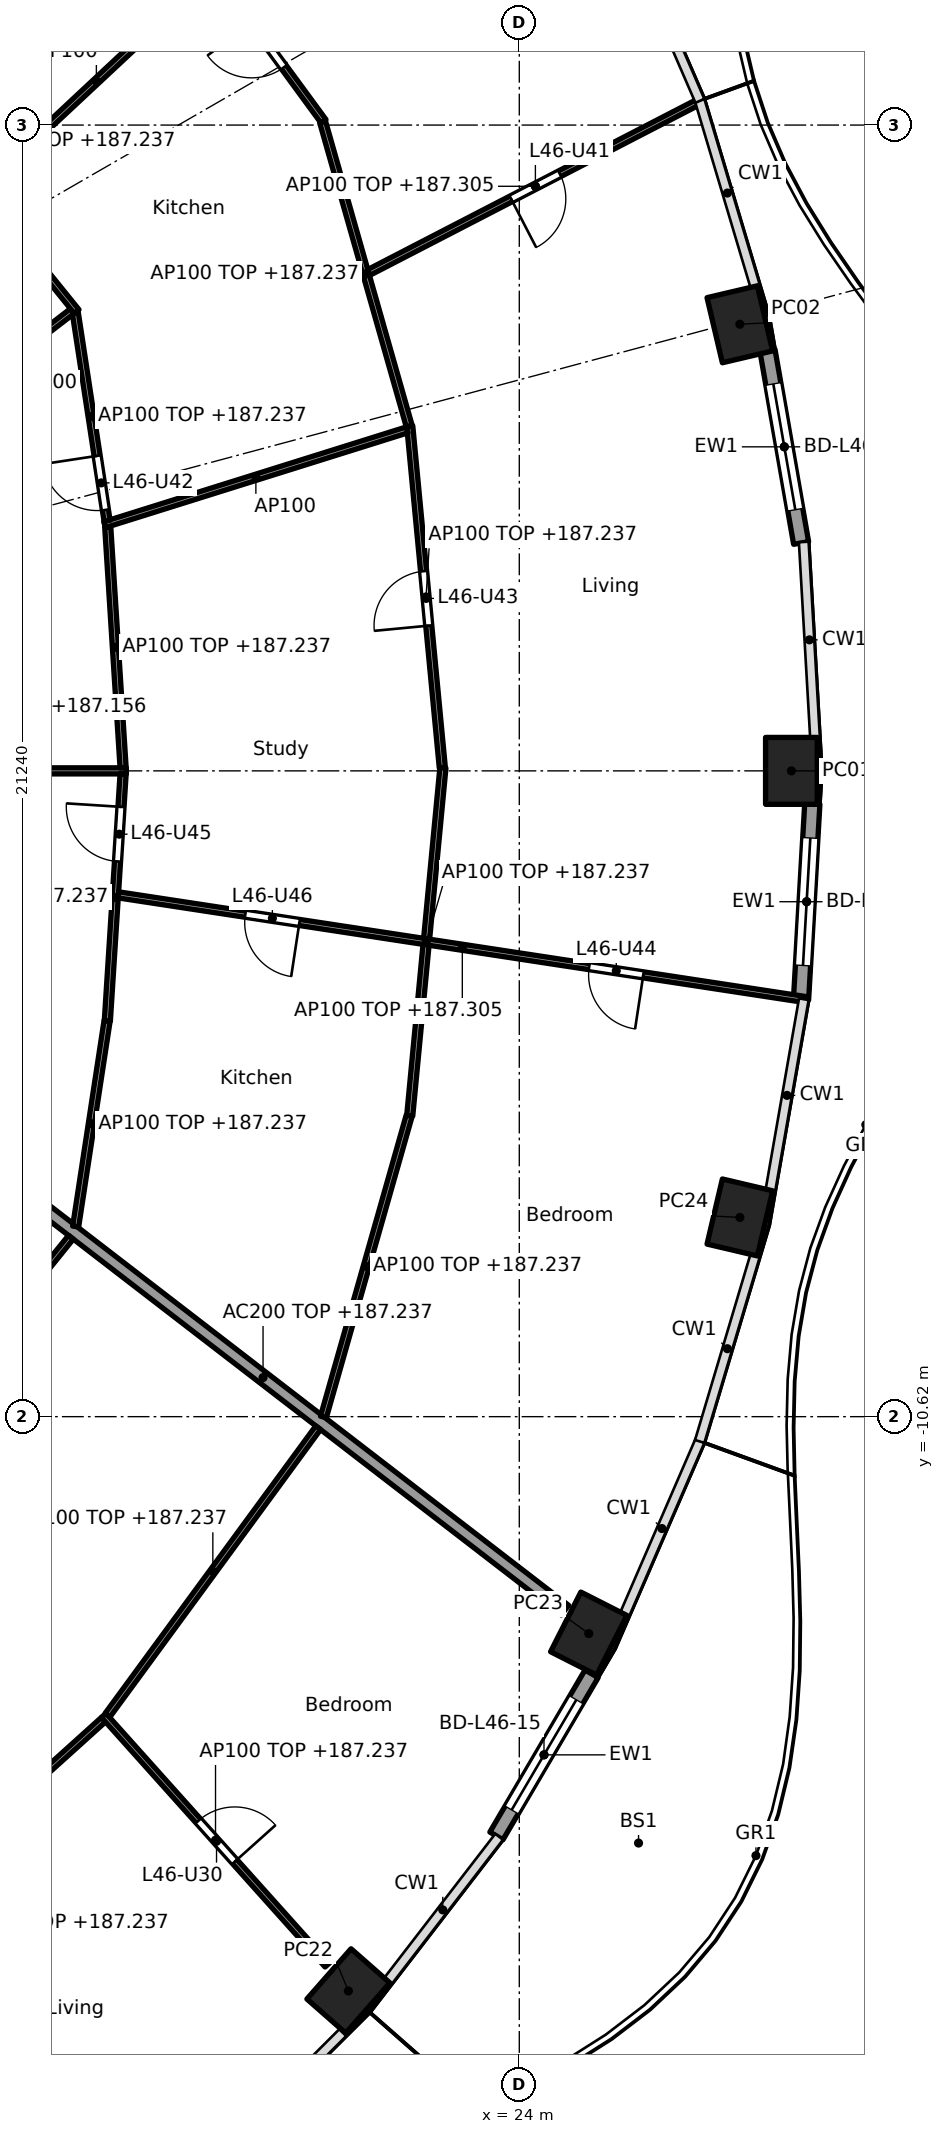
"""IFC4 building model, lengths in metres.
Left out: names, types, materials, properties, quantities, classifications, styles, units other than length and angle.
Written with IfcOpenShell. Run it as: python <this file> out.ifc"""

import sys

from ifc_helpers import new_model, si_unit, direction, frame, frame_2d, origin, origin_2d, place, context, subcontext, project, spatial, rectangle, hollow_rectangle, extrude, element, fill, save


model = new_model("IFC4")
c1 = context("Model", 3, precision=1e-05, world=origin(), true_north=direction((0.0, 1.0)))
c2 = subcontext(c1, "Body", "Model", "MODEL_VIEW")
j1 = project(units=[si_unit("LENGTHUNIT", "METRE"), si_unit("PLANEANGLEUNIT", "RADIAN")], contexts=[c1])
p1 = place(None, origin())
s1 = spatial("IfcSite", under=j1, at=p1, CompositionType="ELEMENT")
p2 = place(p1, origin())
s2 = spatial("IfcBuilding", under=s1, at=p2, CompositionType="ELEMENT")
p3 = place(p2, frame((0.0, 0.0, 184.4)))
s3 = spatial("IfcBuildingStorey", under=s2, at=p3, CompositionType="ELEMENT", Elevation=184.4)
for number, where, z_axis, x_axis in (
    (1, (28.475, 0.0, 0.0), (0.0, 0.0, 1.0), (0.0, 1.0, 0.0)),
    (2, (27.627, 7.344, 0.0), (0.0, 0.0, 1.0), (-0.229, 0.973, 0.0)),
    (3, (21.189, -20.064, 0.0), (0.0, 0.0, 1.0), (0.66, 0.751, 0.0)),
    (4, (25.142, -14.188, 0.0), (0.0, 0.0, 1.0), (0.452, 0.892, 0.0)),
    (5, (27.627, -7.344, 0.0), (0.0, 0.0, 1.0), (0.229, 0.973, 0.0)),
):
    element("IfcColumn", number, at=place(p3, frame(where, z_axis=z_axis, x_axis=x_axis)), inside=s3, PredefinedType="COLUMN", context=c2, shape_type="SweptSolid", body=[
        extrude(hollow_rectangle(XDim=1.1, YDim=0.85, WallThickness=0.036, at=origin_2d()), origin(), (0.0, 0.0, 1.0), 3.7),
    ])
p4 = place(p3, frame((28.082, 6.91, 0.0), z_axis=(0.0, 0.0, 1.0), x_axis=(0.172149769468, -0.985070787747, 0.0)))
e6 = element("IfcWall", 6, at=p4, inside=s3, PredefinedType="SOLIDWALL", context=c2, shape_type="SweptSolid", body=[
    extrude(rectangle(XDim=3.211, YDim=0.25, at=frame_2d((1.605, 0.0))), origin(), (0.0, 0.0, 1.0), 3.44),
])
p5 = place(p4, frame((0.555, 0.0, 0.0)))
e7 = element("IfcOpeningElement", 7, at=p5, cuts=e6, PredefinedType="OPENING", context=c2, shape_type="SweptSolid", body=[
    extrude(rectangle(XDim=2.1, YDim=2.4, at=frame_2d((1.05, 1.2))), frame((0.0, 0.135, 0.0), z_axis=(0.0, -1.0, 0.0), x_axis=(1.0, 0.0, 0.0)), (0.0, 0.0, 1.0), 0.27),
])
p6 = place(p3, frame((25.189, -14.848, 0.0), z_axis=(0.0, 0.0, 1.0), x_axis=(-0.506367803691, -0.862317602386, 0.0)))
e8 = element("IfcWall", 8, at=p6, inside=s3, PredefinedType="SOLIDWALL", context=c2, shape_type="SweptSolid", body=[
    extrude(rectangle(XDim=3.092, YDim=0.25, at=frame_2d((1.546, 0.0))), origin(), (0.0, 0.0, 1.0), 3.44),
])
p7 = place(p6, frame((0.496, 0.0, 0.0)))
e9 = element("IfcOpeningElement", 9, at=p7, cuts=e8, PredefinedType="OPENING", context=c2, shape_type="SweptSolid", body=[
    extrude(rectangle(XDim=2.1, YDim=2.4, at=frame_2d((1.05, 1.2))), frame((0.0, 0.135, 0.0), z_axis=(0.0, -1.0, 0.0), x_axis=(1.0, 0.0, 0.0)), (0.0, 0.0, 1.0), 0.27),
])
p8 = place(p3, frame((28.819, -0.542, 0.0), z_axis=(0.0, 0.0, 1.0), x_axis=(-0.057532692854, -0.998343622834, 0.0)))
e10 = element("IfcWall", 10, at=p8, inside=s3, PredefinedType="SOLIDWALL", context=c2, shape_type="SweptSolid", body=[
    extrude(rectangle(XDim=3.225, YDim=0.25, at=frame_2d((1.613, 0.0))), origin(), (0.0, 0.0, 1.0), 3.44),
])
p9 = place(p8, frame((0.562, 0.0, 0.0)))
e11 = element("IfcOpeningElement", 11, at=p9, cuts=e10, PredefinedType="OPENING", context=c2, shape_type="SweptSolid", body=[
    extrude(rectangle(XDim=2.1, YDim=2.4, at=frame_2d((1.05, 1.2))), frame((0.0, 0.135, 0.0), z_axis=(0.0, -1.0, 0.0), x_axis=(1.0, 0.0, 0.0)), (0.0, 0.0, 1.0), 0.27),
])
p10 = place(p3, frame((14.822, -6.154, 0.0), z_axis=(0.0, 0.0, 1.0), x_axis=(0.792203056092, -0.610257583254, 0.0)))
e12 = element("IfcWall", 12, at=p10, inside=s3, PredefinedType="PARTITIONING", context=c2, shape_type="SweptSolid", body=[
    extrude(rectangle(XDim=12.533, YDim=0.2, at=frame_2d((6.266, 0.0))), origin(), (0.0, 0.0, 1.0), 2.837),
])
p11 = place(p3, frame((12.665, 0.0, 0.0), z_axis=(0.0, 0.0, 1.0), x_axis=(1.0, 0.0, 0.0)))
e13 = element("IfcWall", 13, at=p11, inside=s3, PredefinedType="PARTITIONING", context=c2, shape_type="SweptSolid", body=[
    extrude(rectangle(XDim=4.873, YDim=0.1, at=frame_2d((2.437, 0.0))), origin(), (0.0, 0.0, 1.0), 2.756),
])
p12 = place(p3, frame((17.485, 0.05, 0.0), z_axis=(0.0, 0.0, 1.0), x_axis=(-0.063679314345, 0.99797041285, 0.0)))
e14 = element("IfcWall", 14, at=p12, inside=s3, PredefinedType="PARTITIONING", context=c2, shape_type="SweptSolid", body=[
    extrude(rectangle(XDim=3.972, YDim=0.1, at=frame_2d((1.986, 0.0))), origin(), (0.0, 0.0, 1.0), 2.837),
])
p13 = place(p3, frame((17.485, -0.05, 0.0), z_axis=(0.0, 0.0, 1.0), x_axis=(-0.063673473968, -0.997970785501, 0.0)))
e15 = element("IfcWall", 15, at=p13, inside=s3, PredefinedType="PARTITIONING", context=c2, shape_type="SweptSolid", body=[
    extrude(rectangle(XDim=4.072, YDim=0.1, at=frame_2d((2.036, 0.0))), origin(), (0.0, 0.0, 1.0), 2.837),
])
p14 = place(p13, frame((0.543, 0.0, 0.0)))
e16 = element("IfcOpeningElement", 16, at=p14, cuts=e15, PredefinedType="OPENING", context=c2, shape_type="SweptSolid", body=[
    extrude(rectangle(XDim=0.9, YDim=2.1, at=frame_2d((0.45, 1.05))), frame((0.0, 0.06, 0.0), z_axis=(0.0, -1.0, 0.0), x_axis=(1.0, 0.0, 0.0)), (0.0, 0.0, 1.0), 0.12),
])
p15 = place(p3, frame((22.734, 0.05, 0.0), z_axis=(0.0, 0.0, 1.0), x_axis=(-0.0949274088, 0.995484197292, 0.0)))
e17 = element("IfcWall", 17, at=p15, inside=s3, PredefinedType="PARTITIONING", context=c2, shape_type="SweptSolid", body=[
    extrude(rectangle(XDim=5.648, YDim=0.1, at=frame_2d((2.824, 0.0))), origin(), (0.0, 0.0, 1.0), 2.837),
])
p16 = place(p15, frame((2.349, 0.0, 0.0)))
e18 = element("IfcOpeningElement", 18, at=p16, cuts=e17, PredefinedType="OPENING", context=c2, shape_type="SweptSolid", body=[
    extrude(rectangle(XDim=0.9, YDim=2.1, at=frame_2d((0.45, 1.05))), frame((0.0, 0.06, 0.0), z_axis=(0.0, -1.0, 0.0), x_axis=(1.0, 0.0, 0.0)), (0.0, 0.0, 1.0), 0.12),
])
p17 = place(p3, frame((22.744, 0.05, 0.0), z_axis=(0.0, 0.0, 1.0), x_axis=(-0.094931362305, -0.995483820286, 0.0)))
e19 = element("IfcWall", 19, at=p17, inside=s3, PredefinedType="PARTITIONING", context=c2, shape_type="SweptSolid", body=[
    extrude(rectangle(XDim=5.748, YDim=0.1, at=frame_2d((2.874, 0.0))), origin(), (0.0, 0.0, 1.0), 2.837),
])
p18 = place(p3, frame((17.181, 4.049, 0.0), z_axis=(0.0, 0.0, 1.0), x_axis=(0.954246359918, 0.299021545351, 0.0)))
e20 = element("IfcWall", 20, at=p18, inside=s3, PredefinedType="PARTITIONING", context=c2, shape_type="SweptSolid", body=[
    extrude(rectangle(XDim=5.213, YDim=0.1, at=frame_2d((2.606, 0.0))), origin(), (0.0, 0.0, 1.0), 3.44),
])
p19 = place(p3, frame((17.221, 4.113, 0.0), z_axis=(0.0, 0.0, 1.0), x_axis=(-0.151078880423, 0.988521710379, 0.0)))
e21 = element("IfcWall", 21, at=p19, inside=s3, PredefinedType="PARTITIONING", context=c2, shape_type="SweptSolid", body=[
    extrude(rectangle(XDim=3.469, YDim=0.1, at=frame_2d((1.735, 0.0))), origin(), (0.0, 0.0, 1.0), 2.837),
])
p20 = place(p19, frame((0.18, 0.0, 0.0)))
e22 = element("IfcOpeningElement", 22, at=p20, cuts=e21, PredefinedType="OPENING", context=c2, shape_type="SweptSolid", body=[
    extrude(rectangle(XDim=0.9, YDim=2.1, at=frame_2d((0.45, 1.05))), frame((0.0, 0.06, 0.0), z_axis=(0.0, -1.0, 0.0), x_axis=(1.0, 0.0, 0.0)), (0.0, 0.0, 1.0), 0.12),
])
p21 = place(p3, frame((22.189, 5.67, 0.0), z_axis=(0.0, 0.0, 1.0), x_axis=(-0.273815967041, 0.961782104322, 0.0)))
e23 = element("IfcWall", 23, at=p21, inside=s3, PredefinedType="PARTITIONING", context=c2, shape_type="SweptSolid", body=[
    extrude(rectangle(XDim=5.202, YDim=0.1, at=frame_2d((2.601, 0.0))), origin(), (0.0, 0.0, 1.0), 2.837),
])
p22 = place(p3, frame((21.522, 8.195, 0.0), z_axis=(0.0, 0.0, 1.0), x_axis=(0.888281046031, 0.459300319249, 0.0)))
e24 = element("IfcWall", 24, at=p22, inside=s3, PredefinedType="PARTITIONING", context=c2, shape_type="SweptSolid", body=[
    extrude(rectangle(XDim=6.176, YDim=0.1, at=frame_2d((3.088, 0.0))), origin(), (0.0, 0.0, 1.0), 2.905),
])
p23 = place(p22, frame((2.638, 0.0, 0.0)))
e25 = element("IfcOpeningElement", 25, at=p23, cuts=e24, PredefinedType="OPENING", context=c2, shape_type="SweptSolid", body=[
    extrude(rectangle(XDim=0.9, YDim=2.1, at=frame_2d((0.45, 1.05))), frame((0.0, 0.06, 0.0), z_axis=(0.0, -1.0, 0.0), x_axis=(1.0, 0.0, 0.0)), (0.0, 0.0, 1.0), 0.12),
])
p24 = place(p3, frame((14.822, 6.154, 0.0), z_axis=(0.0, 0.0, 1.0), x_axis=(0.792226528082, 0.610227111987, 0.0)))
e26 = element("IfcWall", 26, at=p24, inside=s3, PredefinedType="PARTITIONING", context=c2, shape_type="SweptSolid", body=[
    extrude(rectangle(XDim=2.307, YDim=0.1, at=frame_2d((1.154, 0.0))), origin(), (0.0, 0.0, 1.0), 3.44),
])
p25 = place(p3, frame((16.721, 7.553, 0.0), z_axis=(0.0, 0.0, 1.0), x_axis=(-0.628753513808, 0.777604667472, 0.0)))
e27 = element("IfcWall", 27, at=p25, inside=s3, PredefinedType="PARTITIONING", context=c2, shape_type="SweptSolid", body=[
    extrude(rectangle(XDim=5.007, YDim=0.1, at=frame_2d((2.504, 0.0))), origin(), (0.0, 0.0, 1.0), 2.837),
])
p26 = place(p3, frame((20.781, 10.681, 0.0), z_axis=(0.0, 0.0, 1.0), x_axis=(-0.591117075283, 0.806585769345, 0.0)))
e28 = element("IfcWall", 28, at=p26, inside=s3, PredefinedType="PARTITIONING", context=c2, shape_type="SweptSolid", body=[
    extrude(rectangle(XDim=6.01, YDim=0.1, at=frame_2d((3.005, 0.0))), origin(), (0.0, 0.0, 1.0), 2.837),
])
p27 = place(p26, frame((1.103, 0.0, 0.0)))
e29 = element("IfcOpeningElement", 29, at=p27, cuts=e28, PredefinedType="OPENING", context=c2, shape_type="SweptSolid", body=[
    extrude(rectangle(XDim=0.9, YDim=2.1, at=frame_2d((0.45, 1.05))), frame((0.0, 0.06, 0.0), z_axis=(0.0, -1.0, 0.0), x_axis=(1.0, 0.0, 0.0)), (0.0, 0.0, 1.0), 0.12),
])
p28 = place(p3, frame((15.152, 9.573, 0.0), z_axis=(0.0, 0.0, 1.0), x_axis=(0.730723083214, 0.682673989294, 0.0)))
e30 = element("IfcWall", 30, at=p28, inside=s3, PredefinedType="PARTITIONING", context=c2, shape_type="SweptSolid", body=[
    extrude(rectangle(XDim=5.183, YDim=0.1, at=frame_2d((2.591, 0.0))), origin(), (0.0, 0.0, 1.0), 3.44),
])
p29 = place(p3, frame((10.178, 7.732, 0.0), z_axis=(0.0, 0.0, 1.0), x_axis=(0.667280084362, 0.744806880348, 0.0)))
e31 = element("IfcWall", 31, at=p29, inside=s3, PredefinedType="PARTITIONING", context=c2, shape_type="SweptSolid", body=[
    extrude(rectangle(XDim=10.572, YDim=0.1, at=frame_2d((5.286, 0.0))), origin(), (0.0, 0.0, 1.0), 2.756),
])
p30 = place(p29, frame((2.07, 0.0, 0.0)))
e32 = element("IfcOpeningElement", 32, at=p30, cuts=e31, PredefinedType="OPENING", context=c2, shape_type="SweptSolid", body=[
    extrude(rectangle(XDim=0.9, YDim=2.1, at=frame_2d((0.45, 1.05))), frame((0.0, 0.06, 0.0), z_axis=(0.0, -1.0, 0.0), x_axis=(1.0, 0.0, 0.0)), (0.0, 0.0, 1.0), 0.12),
])
p31 = place(p29, frame((7.331, 0.0, 0.0)))
e33 = element("IfcOpeningElement", 33, at=p31, cuts=e31, PredefinedType="OPENING", context=c2, shape_type="SweptSolid", body=[
    extrude(rectangle(XDim=0.9, YDim=2.1, at=frame_2d((0.45, 1.05))), frame((0.0, 0.06, 0.0), z_axis=(0.0, -1.0, 0.0), x_axis=(1.0, 0.0, 0.0)), (0.0, 0.0, 1.0), 0.12),
])
p32 = place(p3, frame((12.971, -19.38, 0.0), z_axis=(0.0, 0.0, 1.0), x_axis=(0.742768881471, 0.669547898748, 0.0)))
e34 = element("IfcWall", 34, at=p32, inside=s3, PredefinedType="PARTITIONING", context=c2, shape_type="SweptSolid", body=[
    extrude(rectangle(XDim=5.642, YDim=0.1, at=frame_2d((2.821, 0.0))), origin(), (0.0, 0.0, 1.0), 2.837),
])
p33 = place(p3, frame((13.572, -11.447, 0.0), z_axis=(0.0, 0.0, 1.0), x_axis=(0.628738316533, 0.777616955399, 0.0)))
e35 = element("IfcWall", 35, at=p33, inside=s3, PredefinedType="PARTITIONING", context=c2, shape_type="SweptSolid", body=[
    extrude(rectangle(XDim=4.857, YDim=0.1, at=frame_2d((2.429, 0.0))), origin(), (0.0, 0.0, 1.0), 2.837),
])
p34 = place(p33, frame((1.979, 0.0, 0.0)))
e36 = element("IfcOpeningElement", 36, at=p34, cuts=e35, PredefinedType="OPENING", context=c2, shape_type="SweptSolid", body=[
    extrude(rectangle(XDim=0.9, YDim=2.1, at=frame_2d((0.45, 1.05))), frame((0.0, 0.06, 0.0), z_axis=(0.0, -1.0, 0.0), x_axis=(1.0, 0.0, 0.0)), (0.0, 0.0, 1.0), 0.12),
])
p35 = place(p3, frame((17.166, -15.532, 0.0), z_axis=(0.0, 0.0, 1.0), x_axis=(0.66728415915, -0.744803229684, 0.0)))
e37 = element("IfcWall", 37, at=p35, inside=s3, PredefinedType="PARTITIONING", context=c2, shape_type="SweptSolid", body=[
    extrude(rectangle(XDim=5.511, YDim=0.1, at=frame_2d((2.756, 0.0))), origin(), (0.0, 0.0, 1.0), 2.837),
])
p36 = place(p35, frame((2.331, 0.0, 0.0)))
e38 = element("IfcOpeningElement", 38, at=p36, cuts=e37, PredefinedType="OPENING", context=c2, shape_type="SweptSolid", body=[
    extrude(rectangle(XDim=0.9, YDim=2.1, at=frame_2d((0.45, 1.05))), frame((0.0, 0.06, 0.0), z_axis=(0.0, -1.0, 0.0), x_axis=(1.0, 0.0, 0.0)), (0.0, 0.0, 1.0), 0.12),
])
p37 = place(p3, frame((17.229, -15.529, 0.0), z_axis=(0.0, 0.0, 1.0), x_axis=(0.591110768293, 0.806590391468, 0.0)))
e39 = element("IfcWall", 39, at=p37, inside=s3, PredefinedType="PARTITIONING", context=c2, shape_type="SweptSolid", body=[
    extrude(rectangle(XDim=5.86, YDim=0.1, at=frame_2d((2.93, 0.0))), origin(), (0.0, 0.0, 1.0), 2.837),
])
p38 = place(p3, frame((16.704, -7.493, 0.0), z_axis=(0.0, 0.0, 1.0), x_axis=(0.1510806336, 0.988521442434, 0.0)))
e40 = element("IfcWall", 40, at=p38, inside=s3, PredefinedType="PARTITIONING", context=c2, shape_type="SweptSolid", body=[
    extrude(rectangle(XDim=3.419, YDim=0.1, at=frame_2d((1.71, 0.0))), origin(), (0.0, 0.0, 1.0), 2.837),
])
p39 = place(p3, frame((20.779, -10.625, 0.0), z_axis=(0.0, 0.0, 1.0), x_axis=(0.273819702124, 0.961781040949, 0.0)))
e41 = element("IfcWall", 41, at=p39, inside=s3, PredefinedType="PARTITIONING", context=c2, shape_type="SweptSolid", body=[
    extrude(rectangle(XDim=5.152, YDim=0.1, at=frame_2d((2.576, 0.0))), origin(), (0.0, 0.0, 1.0), 2.837),
])
p40 = place(p3, frame((17.407, -2.039, 0.0), z_axis=(0.0, 0.0, 1.0), x_axis=(0.98858728603, -0.150649188184, 0.0)))
e42 = element("IfcWall", 42, at=p40, inside=s3, PredefinedType="PARTITIONING", context=c2, shape_type="SweptSolid", body=[
    extrude(rectangle(XDim=11.441, YDim=0.1, at=frame_2d((5.721, 0.0))), origin(), (0.0, 0.0, 1.0), 2.905),
])
p41 = place(p40, frame((7.832, 0.0, 0.0)))
e43 = element("IfcOpeningElement", 43, at=p41, cuts=e42, PredefinedType="OPENING", context=c2, shape_type="SweptSolid", body=[
    extrude(rectangle(XDim=0.9, YDim=2.1, at=frame_2d((0.45, 1.05))), frame((0.0, 0.06, 0.0), z_axis=(0.0, -1.0, 0.0), x_axis=(1.0, 0.0, 0.0)), (0.0, 0.0, 1.0), 0.12),
])
p42 = place(p40, frame((2.111, 0.0, 0.0)))
e44 = element("IfcOpeningElement", 44, at=p42, cuts=e42, PredefinedType="OPENING", context=c2, shape_type="SweptSolid", body=[
    extrude(rectangle(XDim=0.9, YDim=2.1, at=frame_2d((0.45, 1.05))), frame((0.0, 0.06, 0.0), z_axis=(0.0, -1.0, 0.0), x_axis=(1.0, 0.0, 0.0)), (0.0, 0.0, 1.0), 0.12),
])
p43 = place(p5, origin())
e45 = element("IfcDoor", 45, at=p43, inside=s3, OperationType="SLIDING_TO_LEFT", PredefinedType="DOOR", context=c2, shape_type="SweptSolid", body=[
    extrude(rectangle(XDim=2.1, YDim=2.4, at=frame_2d((1.05, 1.2))), frame((0.0, 0.025, 0.0), z_axis=(0.0, -1.0, 0.0), x_axis=(1.0, 0.0, 0.0)), (0.0, 0.0, 1.0), 0.05),
])
fill(e7, e45)
p44 = place(p7, origin())
e46 = element("IfcDoor", 46, at=p44, inside=s3, OperationType="SLIDING_TO_LEFT", PredefinedType="DOOR", context=c2, shape_type="SweptSolid", body=[
    extrude(rectangle(XDim=2.1, YDim=2.4, at=frame_2d((1.05, 1.2))), frame((0.0, 0.025, 0.0), z_axis=(0.0, -1.0, 0.0), x_axis=(1.0, 0.0, 0.0)), (0.0, 0.0, 1.0), 0.05),
])
fill(e9, e46)
p45 = place(p9, origin())
e47 = element("IfcDoor", 47, at=p45, inside=s3, OperationType="SLIDING_TO_LEFT", PredefinedType="DOOR", context=c2, shape_type="SweptSolid", body=[
    extrude(rectangle(XDim=2.1, YDim=2.4, at=frame_2d((1.05, 1.2))), frame((0.0, 0.025, 0.0), z_axis=(0.0, -1.0, 0.0), x_axis=(1.0, 0.0, 0.0)), (0.0, 0.0, 1.0), 0.05),
])
fill(e11, e47)
p46 = place(p36, origin())
e48 = element("IfcDoor", 48, at=p46, inside=s3, OperationType="SINGLE_SWING_RIGHT", PredefinedType="DOOR", context=c2, shape_type="SweptSolid", body=[
    extrude(rectangle(XDim=0.9, YDim=2.1, at=frame_2d((0.45, 1.05))), frame((0.0, 0.025, 0.0), z_axis=(0.0, -1.0, 0.0), x_axis=(1.0, 0.0, 0.0)), (0.0, 0.0, 1.0), 0.05),
])
fill(e38, e48)
p47 = place(p27, origin())
e49 = element("IfcDoor", 49, at=p47, inside=s3, OperationType="SINGLE_SWING_RIGHT", PredefinedType="DOOR", context=c2, shape_type="SweptSolid", body=[
    extrude(rectangle(XDim=0.9, YDim=2.1, at=frame_2d((0.45, 1.05))), frame((0.0, 0.025, 0.0), z_axis=(0.0, -1.0, 0.0), x_axis=(1.0, 0.0, 0.0)), (0.0, 0.0, 1.0), 0.05),
])
fill(e29, e49)
p48 = place(p23, frame((0.9, 0.0, 0.0), x_axis=(-1.0, 0.0, 0.0)))
e50 = element("IfcDoor", 50, at=p48, inside=s3, OperationType="SINGLE_SWING_RIGHT", PredefinedType="DOOR", context=c2, shape_type="SweptSolid", body=[
    extrude(rectangle(XDim=0.9, YDim=2.1, at=frame_2d((0.45, 1.05))), frame((0.0, 0.025, 0.0), z_axis=(0.0, -1.0, 0.0), x_axis=(1.0, 0.0, 0.0)), (0.0, 0.0, 1.0), 0.05),
])
fill(e25, e50)
p49 = place(p20, origin())
e51 = element("IfcDoor", 51, at=p49, inside=s3, OperationType="SINGLE_SWING_RIGHT", PredefinedType="DOOR", context=c2, shape_type="SweptSolid", body=[
    extrude(rectangle(XDim=0.9, YDim=2.1, at=frame_2d((0.45, 1.05))), frame((0.0, 0.025, 0.0), z_axis=(0.0, -1.0, 0.0), x_axis=(1.0, 0.0, 0.0)), (0.0, 0.0, 1.0), 0.05),
])
fill(e22, e51)
p50 = place(p16, origin())
e52 = element("IfcDoor", 52, at=p50, inside=s3, OperationType="SINGLE_SWING_LEFT", PredefinedType="DOOR", context=c2, shape_type="SweptSolid", body=[
    extrude(rectangle(XDim=0.9, YDim=2.1, at=frame_2d((0.45, 1.05))), frame((0.0, 0.025, 0.0), z_axis=(0.0, -1.0, 0.0), x_axis=(1.0, 0.0, 0.0)), (0.0, 0.0, 1.0), 0.05),
])
fill(e18, e52)
p51 = place(p41, frame((0.9, 0.0, 0.0), x_axis=(-1.0, 0.0, 0.0)))
e53 = element("IfcDoor", 53, at=p51, inside=s3, OperationType="SINGLE_SWING_LEFT", PredefinedType="DOOR", context=c2, shape_type="SweptSolid", body=[
    extrude(rectangle(XDim=0.9, YDim=2.1, at=frame_2d((0.45, 1.05))), frame((0.0, 0.025, 0.0), z_axis=(0.0, -1.0, 0.0), x_axis=(1.0, 0.0, 0.0)), (0.0, 0.0, 1.0), 0.05),
])
fill(e43, e53)
p52 = place(p14, frame((0.9, 0.0, 0.0), x_axis=(-1.0, 0.0, 0.0)))
e54 = element("IfcDoor", 54, at=p52, inside=s3, OperationType="SINGLE_SWING_RIGHT", PredefinedType="DOOR", context=c2, shape_type="SweptSolid", body=[
    extrude(rectangle(XDim=0.9, YDim=2.1, at=frame_2d((0.45, 1.05))), frame((0.0, 0.025, 0.0), z_axis=(0.0, -1.0, 0.0), x_axis=(1.0, 0.0, 0.0)), (0.0, 0.0, 1.0), 0.05),
])
fill(e16, e54)
p53 = place(p42, frame((0.9, 0.0, 0.0), x_axis=(-1.0, 0.0, 0.0)))
e55 = element("IfcDoor", 55, at=p53, inside=s3, OperationType="SINGLE_SWING_LEFT", PredefinedType="DOOR", context=c2, shape_type="SweptSolid", body=[
    extrude(rectangle(XDim=0.9, YDim=2.1, at=frame_2d((0.45, 1.05))), frame((0.0, 0.025, 0.0), z_axis=(0.0, -1.0, 0.0), x_axis=(1.0, 0.0, 0.0)), (0.0, 0.0, 1.0), 0.05),
])
fill(e44, e55)
save(model, sys.argv[1])
